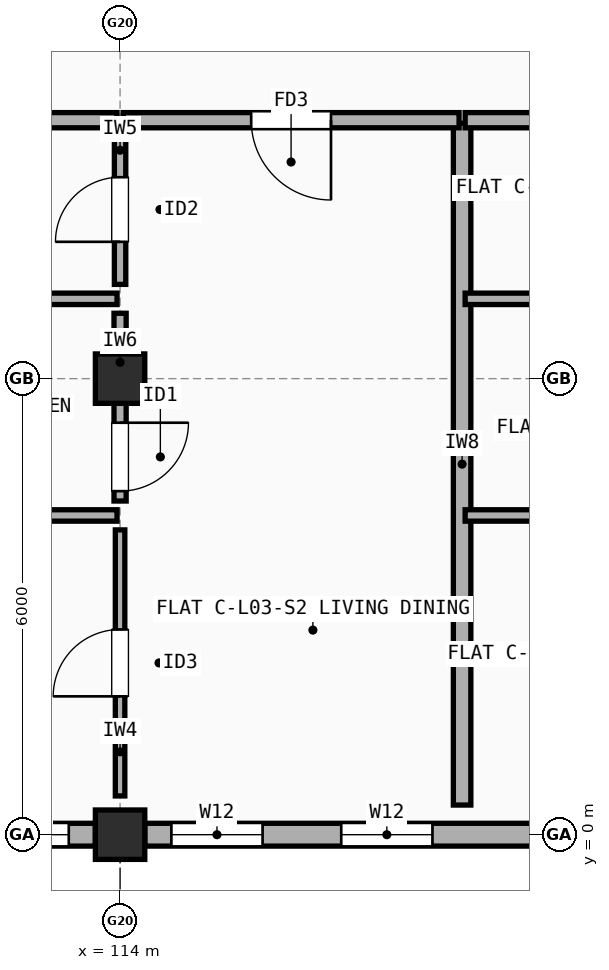
"""IFC4 building model, lengths in metres.
Left out: names, types, materials, properties, quantities, classifications, styles, units other than length and angle.
Written with IfcOpenShell. Run it as: python <this file> out.ifc"""

import sys

from ifc_helpers import new_model, si_unit, direction, frame, frame_2d, origin, origin_2d, place, context, subcontext, project, spatial, rectangle, extrude, element, fill, save


model = new_model("IFC4")
c1 = context("Model", 3, precision=1e-05, world=origin(), true_north=direction((0.0, 1.0)))
c2 = subcontext(c1, "Body", "Model", "MODEL_VIEW")
j1 = project(units=[si_unit("LENGTHUNIT", "METRE"), si_unit("PLANEANGLEUNIT", "RADIAN")], contexts=[c1])
p1 = place(None, origin())
s1 = spatial("IfcSite", under=j1, at=p1, CompositionType="ELEMENT")
p2 = place(p1, origin())
s2 = spatial("IfcBuilding", under=s1, at=p2, CompositionType="ELEMENT")
p3 = place(p2, frame((0.0, 0.0, 10.9)))
s3 = spatial("IfcBuildingStorey", under=s2, at=p3, CompositionType="ELEMENT", Elevation=10.9)
for number, where, z_axis, x_axis in (
    (1, (114.0, 0.0, 0.0), (0.0, 0.0, 1.0), (1.0, 0.0, 0.0)),
    (2, (114.0, 6.0, 0.0), (0.0, 0.0, 1.0), (1.0, 0.0, 0.0)),
):
    element("IfcColumn", number, at=place(p3, frame(where, z_axis=z_axis, x_axis=x_axis)), inside=s3, PredefinedType="COLUMN", context=c2, shape_type="SweptSolid", body=[
        extrude(rectangle(XDim=0.65, YDim=0.65, at=origin_2d()), origin(), (0.0, 0.0, 1.0), 2.96),
    ])
p4 = place(p3, frame((108.325, 0.0, 0.0), z_axis=(0.0, 0.0, 1.0), x_axis=(1.0, 0.0, 0.0)))
e3 = element("IfcWall", 3, at=p4, inside=s3, PredefinedType="STANDARD", context=c2, shape_type="SweptSolid", body=[
    extrude(rectangle(XDim=5.35, YDim=0.3, at=frame_2d((2.675, 0.0))), origin(), (0.0, 0.0, 1.0), 2.442),
])
p5 = place(p4, frame((1.565, 0.0, 0.9)))
e4 = element("IfcOpeningElement", 4, at=p5, cuts=e3, PredefinedType="OPENING", context=c2, shape_type="SweptSolid", body=[
    extrude(rectangle(XDim=0.95, YDim=1.35, at=frame_2d((0.475, 0.675))), frame((0.0, 0.16, 0.0), z_axis=(0.0, -1.0, 0.0), x_axis=(1.0, 0.0, 0.0)), (0.0, 0.0, 1.0), 0.32),
])
p6 = place(p4, frame((4.05, 0.0, 0.9)))
e5 = element("IfcOpeningElement", 5, at=p6, cuts=e3, PredefinedType="OPENING", context=c2, shape_type="SweptSolid", body=[
    extrude(rectangle(XDim=0.95, YDim=1.35, at=frame_2d((0.475, 0.675))), frame((0.0, 0.16, 0.0), z_axis=(0.0, -1.0, 0.0), x_axis=(1.0, 0.0, 0.0)), (0.0, 0.0, 1.0), 0.32),
])
p7 = place(p3, frame((114.325, 0.0, 0.0), z_axis=(0.0, 0.0, 1.0), x_axis=(1.0, 0.0, 0.0)))
e6 = element("IfcWall", 6, at=p7, inside=s3, PredefinedType="STANDARD", context=c2, shape_type="SweptSolid", body=[
    extrude(rectangle(XDim=5.35, YDim=0.3, at=frame_2d((2.675, 0.0))), origin(), (0.0, 0.0, 1.0), 2.442),
])
p8 = place(p7, frame((0.35, 0.0, 0.9)))
e7 = element("IfcOpeningElement", 7, at=p8, cuts=e6, PredefinedType="OPENING", context=c2, shape_type="SweptSolid", body=[
    extrude(rectangle(XDim=1.2, YDim=1.35, at=frame_2d((0.6, 0.675))), frame((0.0, 0.16, 0.0), z_axis=(0.0, -1.0, 0.0), x_axis=(1.0, 0.0, 0.0)), (0.0, 0.0, 1.0), 0.32),
])
p9 = place(p7, frame((2.585, 0.0, 0.9)))
e8 = element("IfcOpeningElement", 8, at=p9, cuts=e6, PredefinedType="OPENING", context=c2, shape_type="SweptSolid", body=[
    extrude(rectangle(XDim=1.2, YDim=1.35, at=frame_2d((0.6, 0.675))), frame((0.0, 0.16, 0.0), z_axis=(0.0, -1.0, 0.0), x_axis=(1.0, 0.0, 0.0)), (0.0, 0.0, 1.0), 0.32),
])
p10 = place(p3, frame((118.5, 0.39, 0.0), z_axis=(0.0, 0.0, 1.0), x_axis=(0.0, 1.0, 0.0)))
e9 = element("IfcWall", 9, at=p10, inside=s3, PredefinedType="SOLIDWALL", context=c2, shape_type="SweptSolid", body=[
    extrude(rectangle(XDim=8.97, YDim=0.23, at=frame_2d((4.485, 0.0))), origin(), (0.0, 0.0, 1.0), 2.442),
])
p11 = place(p3, frame((109.54, 9.4, 0.0), z_axis=(0.0, 0.0, 1.0), x_axis=(1.0, 0.0, 0.0)))
e10 = element("IfcWall", 10, at=p11, inside=s3, PredefinedType="SOLIDWALL", context=c2, shape_type="SweptSolid", body=[
    extrude(rectangle(XDim=4.42, YDim=0.2, at=frame_2d((2.21, 0.0))), origin(), (0.0, 0.0, 1.0), 2.548),
])
p12 = place(p3, frame((114.04, 9.4, 0.0), z_axis=(0.0, 0.0, 1.0), x_axis=(1.0, 0.0, 0.0)))
e11 = element("IfcWall", 11, at=p12, inside=s3, PredefinedType="SOLIDWALL", context=c2, shape_type="SweptSolid", body=[
    extrude(rectangle(XDim=4.42, YDim=0.2, at=frame_2d((2.21, 0.0))), origin(), (0.0, 0.0, 1.0), 2.548),
])
p13 = place(p12, frame((1.685, 0.0, 0.0)))
e12 = element("IfcOpeningElement", 12, at=p13, cuts=e11, PredefinedType="OPENING", context=c2, shape_type="SweptSolid", body=[
    extrude(rectangle(XDim=1.05, YDim=2.15, at=frame_2d((0.525, 1.075))), frame((0.0, 0.11, 0.0), z_axis=(0.0, -1.0, 0.0), x_axis=(1.0, 0.0, 0.0)), (0.0, 0.0, 1.0), 0.22),
])
p14 = place(p3, frame((114.0, 0.51, 0.0), z_axis=(0.0, 0.0, 1.0), x_axis=(0.0, 1.0, 0.0)))
e13 = element("IfcWall", 13, at=p14, inside=s3, PredefinedType="PARTITIONING", context=c2, shape_type="SweptSolid", body=[
    extrude(rectangle(XDim=3.5, YDim=0.125, at=frame_2d((1.75, 0.0))), origin(), (0.0, 0.0, 1.0), 2.458),
])
p15 = place(p14, frame((1.31, 0.0, 0.0)))
e14 = element("IfcOpeningElement", 14, at=p15, cuts=e13, PredefinedType="OPENING", context=c2, shape_type="SweptSolid", body=[
    extrude(rectangle(XDim=0.88, YDim=2.1, at=frame_2d((0.44, 1.05))), frame((0.0, 0.073, 0.0), z_axis=(0.0, -1.0, 0.0), x_axis=(1.0, 0.0, 0.0)), (0.0, 0.0, 1.0), 0.145),
])
p16 = place(p3, frame((114.0, 4.39, 0.0), z_axis=(0.0, 0.0, 1.0), x_axis=(0.0, 1.0, 0.0)))
e15 = element("IfcWall", 15, at=p16, inside=s3, PredefinedType="PLUMBINGWALL", context=c2, shape_type="SweptSolid", body=[
    extrude(rectangle(XDim=2.47, YDim=0.16, at=frame_2d((1.235, 0.0))), origin(), (0.0, 0.0, 1.0), 2.458),
])
p17 = place(p16, frame((0.13, 0.0, 0.0)))
e16 = element("IfcOpeningElement", 16, at=p17, cuts=e15, PredefinedType="OPENING", context=c2, shape_type="SweptSolid", body=[
    extrude(rectangle(XDim=0.9, YDim=2.1, at=frame_2d((0.45, 1.05))), frame((0.0, 0.09, 0.0), z_axis=(0.0, -1.0, 0.0), x_axis=(1.0, 0.0, 0.0)), (0.0, 0.0, 1.0), 0.18),
])
p18 = place(p3, frame((114.0, 7.24, 0.0), z_axis=(0.0, 0.0, 1.0), x_axis=(0.0, 1.0, 0.0)))
e17 = element("IfcWall", 17, at=p18, inside=s3, PredefinedType="PARTITIONING", context=c2, shape_type="SweptSolid", body=[
    extrude(rectangle(XDim=1.97, YDim=0.15, at=frame_2d((0.985, 0.0))), origin(), (0.0, 0.0, 1.0), 2.548),
])
p19 = place(p18, frame((0.56, 0.0, 0.0)))
e18 = element("IfcOpeningElement", 18, at=p19, cuts=e17, PredefinedType="OPENING", context=c2, shape_type="SweptSolid", body=[
    extrude(rectangle(XDim=0.85, YDim=2.1, at=frame_2d((0.425, 1.05))), frame((0.0, 0.085, 0.0), z_axis=(0.0, -1.0, 0.0), x_axis=(1.0, 0.0, 0.0)), (0.0, 0.0, 1.0), 0.17),
])
p20 = place(p3, frame((109.54, 4.2, 0.0), z_axis=(0.0, 0.0, 1.0), x_axis=(1.0, 0.0, 0.0)))
e19 = element("IfcWall", 19, at=p20, inside=s3, PredefinedType="PARTITIONING", context=c2, shape_type="SweptSolid", body=[
    extrude(rectangle(XDim=4.42, YDim=0.15, at=frame_2d((2.21, 0.0))), origin(), (0.0, 0.0, 1.0), 2.458),
])
p21 = place(p3, frame((109.54, 7.05, 0.0), z_axis=(0.0, 0.0, 1.0), x_axis=(1.0, 0.0, 0.0)))
e20 = element("IfcWall", 20, at=p21, inside=s3, PredefinedType="PARTITIONING", context=c2, shape_type="SweptSolid", body=[
    extrude(rectangle(XDim=4.42, YDim=0.15, at=frame_2d((2.21, 0.0))), origin(), (0.0, 0.0, 1.0), 2.548),
])
p22 = place(p3, frame((118.54, 9.4, 0.0), z_axis=(0.0, 0.0, 1.0), x_axis=(1.0, 0.0, 0.0)))
e21 = element("IfcWall", 21, at=p22, inside=s3, PredefinedType="SOLIDWALL", context=c2, shape_type="SweptSolid", body=[
    extrude(rectangle(XDim=4.42, YDim=0.2, at=frame_2d((2.21, 0.0))), origin(), (0.0, 0.0, 1.0), 2.458),
])
p23 = place(p3, frame((118.54, 4.2, 0.0), z_axis=(0.0, 0.0, 1.0), x_axis=(1.0, 0.0, 0.0)))
e22 = element("IfcWall", 22, at=p23, inside=s3, PredefinedType="PARTITIONING", context=c2, shape_type="SweptSolid", body=[
    extrude(rectangle(XDim=4.42, YDim=0.15, at=frame_2d((2.21, 0.0))), origin(), (0.0, 0.0, 1.0), 2.508),
])
p24 = place(p3, frame((118.54, 7.05, 0.0), z_axis=(0.0, 0.0, 1.0), x_axis=(1.0, 0.0, 0.0)))
e23 = element("IfcWall", 23, at=p24, inside=s3, PredefinedType="PARTITIONING", context=c2, shape_type="SweptSolid", body=[
    extrude(rectangle(XDim=4.42, YDim=0.15, at=frame_2d((2.21, 0.0))), origin(), (0.0, 0.0, 1.0), 2.458),
])
p25 = place(p6, origin())
e24 = element("IfcWindow", 24, at=p25, inside=s3, PartitioningType="SINGLE_PANEL", PredefinedType="WINDOW", context=c2, shape_type="SweptSolid", body=[
    extrude(rectangle(XDim=0.95, YDim=1.35, at=frame_2d((0.475, 0.675))), frame((0.0, 0.03, 0.0), z_axis=(0.0, -1.0, 0.0), x_axis=(1.0, 0.0, 0.0)), (0.0, 0.0, 1.0), 0.06),
])
fill(e5, e24)
p26 = place(p8, origin())
e25 = element("IfcWindow", 25, at=p26, inside=s3, PartitioningType="SINGLE_PANEL", PredefinedType="WINDOW", context=c2, shape_type="SweptSolid", body=[
    extrude(rectangle(XDim=1.2, YDim=1.35, at=frame_2d((0.6, 0.675))), frame((0.0, 0.03, 0.0), z_axis=(0.0, -1.0, 0.0), x_axis=(1.0, 0.0, 0.0)), (0.0, 0.0, 1.0), 0.06),
])
fill(e7, e25)
p27 = place(p9, origin())
e26 = element("IfcWindow", 26, at=p27, inside=s3, PartitioningType="SINGLE_PANEL", PredefinedType="WINDOW", context=c2, shape_type="SweptSolid", body=[
    extrude(rectangle(XDim=1.2, YDim=1.35, at=frame_2d((0.6, 0.675))), frame((0.0, 0.03, 0.0), z_axis=(0.0, -1.0, 0.0), x_axis=(1.0, 0.0, 0.0)), (0.0, 0.0, 1.0), 0.06),
])
fill(e8, e26)
p28 = place(p13, origin())
e27 = element("IfcDoor", 27, at=p28, inside=s3, OperationType="SINGLE_SWING_RIGHT", PredefinedType="DOOR", context=c2, shape_type="SweptSolid", body=[
    extrude(rectangle(XDim=1.05, YDim=2.15, at=frame_2d((0.525, 1.075))), frame((0.0, 0.025, 0.0), z_axis=(0.0, -1.0, 0.0), x_axis=(1.0, 0.0, 0.0)), (0.0, 0.0, 1.0), 0.05),
])
fill(e12, e27)
p29 = place(p15, origin())
e28 = element("IfcDoor", 28, at=p29, inside=s3, OperationType="SINGLE_SWING_LEFT", PredefinedType="DOOR", context=c2, shape_type="SweptSolid", body=[
    extrude(rectangle(XDim=0.88, YDim=2.1, at=frame_2d((0.44, 1.05))), frame((0.0, 0.025, 0.0), z_axis=(0.0, -1.0, 0.0), x_axis=(1.0, 0.0, 0.0)), (0.0, 0.0, 1.0), 0.05),
])
fill(e14, e28)
p30 = place(p17, origin())
e29 = element("IfcDoor", 29, at=p30, inside=s3, OperationType="SINGLE_SWING_RIGHT", PredefinedType="DOOR", context=c2, shape_type="SweptSolid", body=[
    extrude(rectangle(XDim=0.9, YDim=2.1, at=frame_2d((0.45, 1.05))), frame((0.0, 0.025, 0.0), z_axis=(0.0, -1.0, 0.0), x_axis=(1.0, 0.0, 0.0)), (0.0, 0.0, 1.0), 0.05),
])
fill(e16, e29)
p31 = place(p19, origin())
e30 = element("IfcDoor", 30, at=p31, inside=s3, OperationType="SINGLE_SWING_LEFT", PredefinedType="DOOR", context=c2, shape_type="SweptSolid", body=[
    extrude(rectangle(XDim=0.85, YDim=2.1, at=frame_2d((0.425, 1.05))), frame((0.0, 0.025, 0.0), z_axis=(0.0, -1.0, 0.0), x_axis=(1.0, 0.0, 0.0)), (0.0, 0.0, 1.0), 0.05),
])
fill(e18, e30)
save(model, sys.argv[1])
